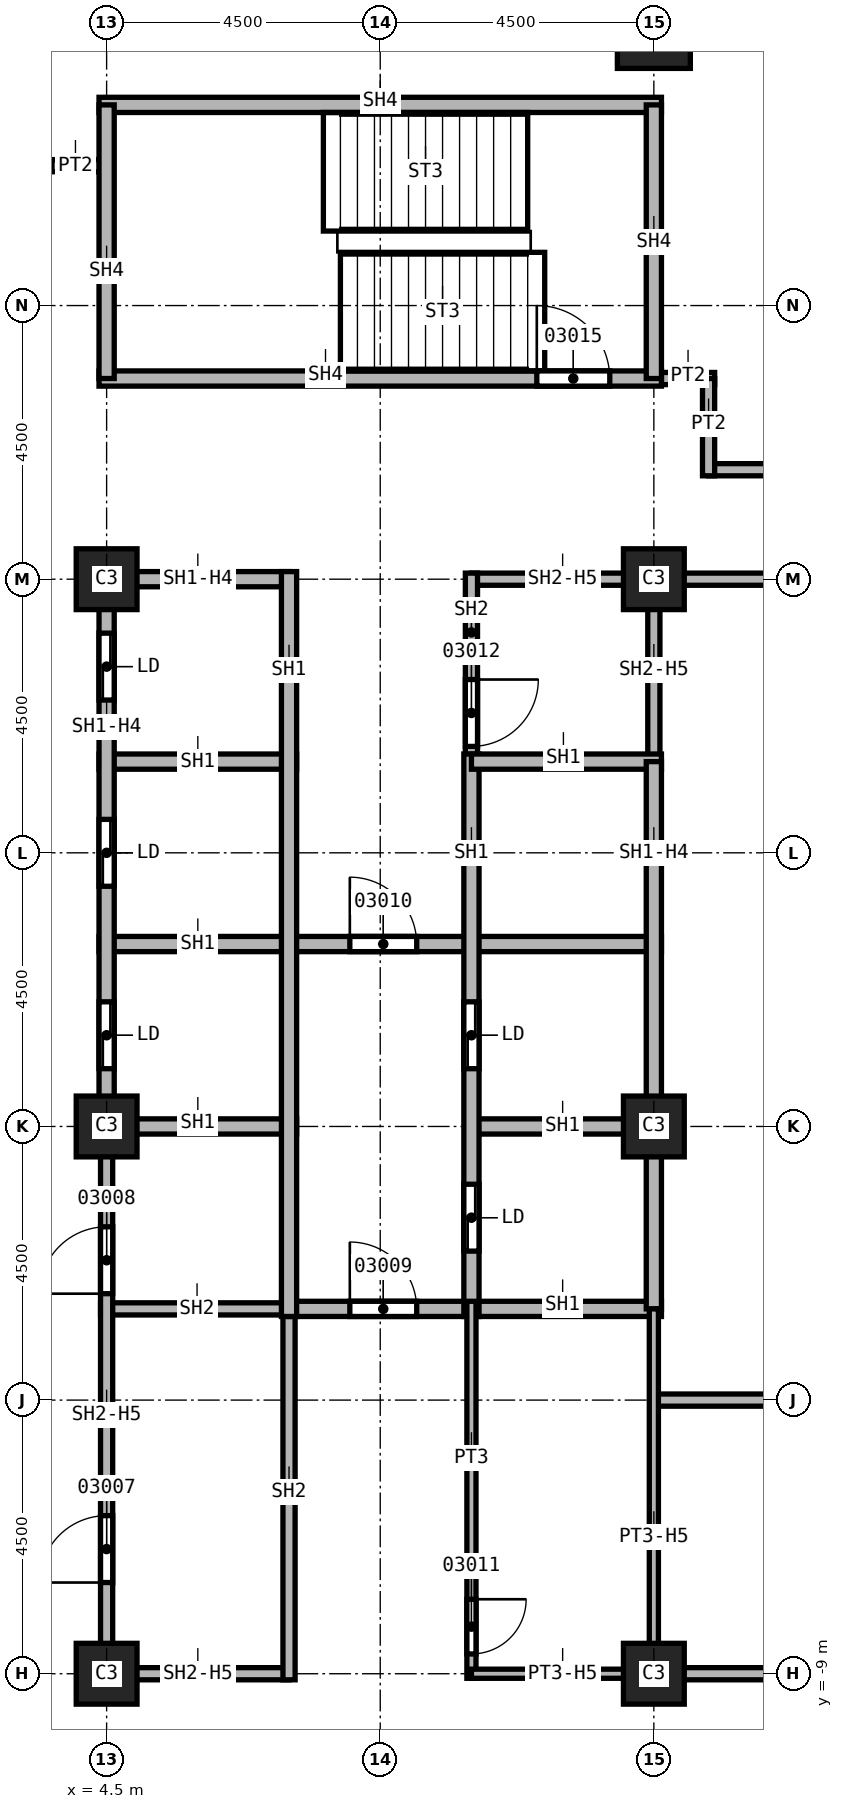
"""IFC4 building model, lengths in metres.
Left out: names, types, materials, properties, quantities, classifications, styles, units other than length and angle.
Written with IfcOpenShell. Run it as: python <this file> out.ifc"""

import sys

from ifc_helpers import new_model, si_unit, direction, frame, frame_2d, origin, origin_2d, place, context, subcontext, project, spatial, rectangle, extrude, element, fill, save


model = new_model("IFC4")
c1 = context("Model", 3, precision=1e-05, world=origin(), true_north=direction((0.0, 1.0)))
c2 = subcontext(c1, "Body", "Model", "MODEL_VIEW")
j1 = project(units=[si_unit("LENGTHUNIT", "METRE"), si_unit("PLANEANGLEUNIT", "RADIAN")], contexts=[c1])
p1 = place(None, origin())
s1 = spatial("IfcSite", under=j1, at=p1, CompositionType="ELEMENT")
p2 = place(p1, origin())
s2 = spatial("IfcBuilding", under=s1, at=p2, CompositionType="ELEMENT")
p3 = place(p2, frame((0.0, 0.0, 92.0)))
s3 = spatial("IfcBuildingStorey", under=s2, at=p3, CompositionType="ELEMENT", Elevation=92.0)
p4 = place(p3, frame((13.5, 18.0, 0.0), z_axis=(0.0, 0.0, 1.0), x_axis=(1.0, 0.0, 0.0)))
e1 = element("IfcColumn", 1, at=p4, inside=s3, PredefinedType="COLUMN", context=c2, shape_type="SweptSolid", body=[
    extrude(rectangle(XDim=1.2, YDim=1.2, at=origin_2d()), origin(), (0.0, 0.0, 1.0), 3.7),
])
for number, where, z_axis, x_axis in (
    (2, (4.5, 0.0, 0.0), (0.0, 0.0, 1.0), (1.0, 0.0, 0.0)),
    (3, (4.5, 9.0, 0.0), (0.0, 0.0, 1.0), (1.0, 0.0, 0.0)),
    (4, (4.5, -9.0, 0.0), (0.0, 0.0, 1.0), (1.0, 0.0, 0.0)),
    (5, (13.5, 0.0, 0.0), (0.0, 0.0, 1.0), (1.0, 0.0, 0.0)),
    (6, (13.5, 9.0, 0.0), (0.0, 0.0, 1.0), (1.0, 0.0, 0.0)),
    (7, (13.5, -9.0, 0.0), (0.0, 0.0, 1.0), (1.0, 0.0, 0.0)),
):
    element("IfcColumn", number, at=place(p3, frame(where, z_axis=z_axis, x_axis=x_axis)), inside=s3, PredefinedType="COLUMN", context=c2, shape_type="SweptSolid", body=[
        extrude(rectangle(XDim=1.0, YDim=1.0, at=origin_2d()), origin(), (0.0, 0.0, 1.0), 3.7),
    ])
p5 = place(p3, frame((3.6, 15.8, 0.0), z_axis=(0.0, 0.0, 1.0), x_axis=(1.0, 0.0, 0.0)))
e8 = element("IfcWall", 8, at=p5, inside=s3, PredefinedType="PARTITIONING", context=c2, shape_type="SweptSolid", body=[
    extrude(rectangle(XDim=0.9, YDim=0.2, at=frame_2d((0.45, 0.0))), origin(), (0.0, 0.0, 1.0), 3.7),
])
p6 = place(p3, frame((13.375, 12.3, 0.0), z_axis=(0.0, 0.0, 1.0), x_axis=(1.0, 0.0, 0.0)))
e9 = element("IfcWall", 9, at=p6, inside=s3, PredefinedType="PARTITIONING", context=c2, shape_type="SweptSolid", body=[
    extrude(rectangle(XDim=1.125, YDim=0.2, at=frame_2d((0.562, 0.0))), origin(), (0.0, 0.0, 1.0), 3.7),
])
for number, where, z_axis, x_axis in (
    (10, (13.5, -9.0, 0.0), (0.0, 0.0, 1.0), (1.0, 0.0, 0.0)),
    (11, (13.5, -4.5, 0.0), (0.0, 0.0, 1.0), (1.0, 0.0, 0.0)),
    (12, (18.0, 9.0, 0.0), (0.0, 0.0, 1.0), (-1.0, 0.0, 0.0)),
):
    element("IfcWall", number, at=place(p3, frame(where, z_axis=z_axis, x_axis=x_axis)), inside=s3, PredefinedType="PARTITIONING", context=c2, shape_type="SweptSolid", body=[
        extrude(rectangle(XDim=4.5, YDim=0.2, at=frame_2d((2.25, 0.0))), origin(), (0.0, 0.0, 1.0), 3.7),
    ])
p7 = place(p3, frame((14.4, 10.8, 0.0), z_axis=(0.0, 0.0, 1.0), x_axis=(1.0, 0.0, 0.0)))
e13 = element("IfcWall", 13, at=p7, inside=s3, PredefinedType="PARTITIONING", context=c2, shape_type="SweptSolid", body=[
    extrude(rectangle(XDim=3.6, YDim=0.2, at=frame_2d((1.8, 0.0))), origin(), (0.0, 0.0, 1.0), 3.7),
])
p8 = place(p3, frame((14.4, 12.3, 0.0), z_axis=(0.0, 0.0, 1.0), x_axis=(0.0, -1.0, 0.0)))
e14 = element("IfcWall", 14, at=p8, inside=s3, PredefinedType="PARTITIONING", context=c2, shape_type="SweptSolid", body=[
    extrude(rectangle(XDim=1.6, YDim=0.2, at=frame_2d((0.8, 0.0))), origin(), (0.0, 0.0, 1.0), 3.7),
])
p9 = place(p3, frame((4.4, -3.0, 0.0), z_axis=(0.0, 0.0, 1.0), x_axis=(1.0, 0.0, 0.0)))
e15 = element("IfcWall", 15, at=p9, inside=s3, PredefinedType="SOLIDWALL", context=c2, shape_type="SweptSolid", body=[
    extrude(rectangle(XDim=3.225, YDim=0.2, at=frame_2d((1.613, 0.0))), origin(), (0.0, 0.0, 1.0), 3.7),
])
p10 = place(p3, frame((4.5, -9.1, 0.0), z_axis=(0.0, 0.0, 1.0), x_axis=(0.0, 1.0, 0.0)))
e16 = element("IfcWall", 16, at=p10, inside=s3, PredefinedType="SOLIDWALL", context=c2, shape_type="SweptSolid", body=[
    extrude(rectangle(XDim=9.1, YDim=0.2, at=frame_2d((4.55, 0.0))), origin(), (0.0, 0.0, 1.0), 2.938),
])
p11 = place(p10, frame((1.6, 0.0, 0.0)))
e17 = element("IfcOpeningElement", 17, at=p11, cuts=e16, PredefinedType="OPENING", context=c2, shape_type="SweptSolid", body=[
    extrude(rectangle(XDim=1.1, YDim=2.1, at=frame_2d((0.55, 1.05))), frame((0.0, 0.1, 0.0), z_axis=(0.0, -1.0, 0.0), x_axis=(1.0, 0.0, 0.0)), (0.0, 0.0, 1.0), 0.2),
])
p12 = place(p10, frame((6.35, 0.0, 0.0)))
e18 = element("IfcOpeningElement", 18, at=p12, cuts=e16, PredefinedType="OPENING", context=c2, shape_type="SweptSolid", body=[
    extrude(rectangle(XDim=1.1, YDim=2.1, at=frame_2d((0.55, 1.05))), frame((0.0, 0.1, 0.0), z_axis=(0.0, -1.0, 0.0), x_axis=(1.0, 0.0, 0.0)), (0.0, 0.0, 1.0), 0.2),
])
p13 = place(p3, frame((7.5, -9.0, 0.0), z_axis=(0.0, 0.0, 1.0), x_axis=(-1.0, 0.0, 0.0)))
e19 = element("IfcWall", 19, at=p13, inside=s3, PredefinedType="SOLIDWALL", context=c2, shape_type="SweptSolid", body=[
    extrude(rectangle(XDim=3.0, YDim=0.2, at=frame_2d((1.5, 0.0))), origin(), (0.0, 0.0, 1.0), 2.938),
])
p14 = place(p3, frame((7.5, -2.875, 0.0), z_axis=(0.0, 0.0, 1.0), x_axis=(0.0, -1.0, 0.0)))
e20 = element("IfcWall", 20, at=p14, inside=s3, PredefinedType="SOLIDWALL", context=c2, shape_type="SweptSolid", body=[
    extrude(rectangle(XDim=6.225, YDim=0.2, at=frame_2d((3.113, 0.0))), origin(), (0.0, 0.0, 1.0), 3.7),
])
p15 = place(p3, frame((10.5, 9.0, 0.0), z_axis=(0.0, 0.0, 1.0), x_axis=(1.0, 0.0, 0.0)))
e21 = element("IfcWall", 21, at=p15, inside=s3, PredefinedType="SOLIDWALL", context=c2, shape_type="SweptSolid", body=[
    extrude(rectangle(XDim=3.1, YDim=0.2, at=frame_2d((1.55, 0.0))), origin(), (0.0, 0.0, 1.0), 2.938),
])
p16 = place(p3, frame((10.5, 9.1, 0.0), z_axis=(0.0, 0.0, 1.0), x_axis=(0.0, -1.0, 0.0)))
e22 = element("IfcWall", 22, at=p16, inside=s3, PredefinedType="SOLIDWALL", context=c2, shape_type="SweptSolid", body=[
    extrude(rectangle(XDim=3.225, YDim=0.2, at=frame_2d((1.613, 0.0))), origin(), (0.0, 0.0, 1.0), 3.7),
])
p17 = place(p16, frame((1.75, 0.0, 0.0)))
e23 = element("IfcOpeningElement", 23, at=p17, cuts=e22, PredefinedType="OPENING", context=c2, shape_type="SweptSolid", body=[
    extrude(rectangle(XDim=1.1, YDim=2.1, at=frame_2d((0.55, 1.05))), frame((0.0, 0.1, 0.0), z_axis=(0.0, -1.0, 0.0), x_axis=(1.0, 0.0, 0.0)), (0.0, 0.0, 1.0), 0.2),
])
p18 = place(p3, frame((13.5, 9.1, 0.0), z_axis=(0.0, 0.0, 1.0), x_axis=(0.0, -1.0, 0.0)))
e24 = element("IfcWall", 24, at=p18, inside=s3, PredefinedType="SOLIDWALL", context=c2, shape_type="SweptSolid", body=[
    extrude(rectangle(XDim=3.1, YDim=0.2, at=frame_2d((1.55, 0.0))), origin(), (0.0, 0.0, 1.0), 2.938),
])
p19 = place(p3, frame((4.375, 0.0, 0.0), z_axis=(0.0, 0.0, 1.0), x_axis=(1.0, 0.0, 0.0)))
e25 = element("IfcWall", 25, at=p19, inside=s3, PredefinedType="SOLIDWALL", context=c2, shape_type="SweptSolid", body=[
    extrude(rectangle(XDim=3.25, YDim=0.25, at=frame_2d((1.625, 0.0))), origin(), (0.0, 0.0, 1.0), 3.7),
])
p20 = place(p3, frame((4.375, 3.0, 0.0), z_axis=(0.0, 0.0, 1.0), x_axis=(1.0, 0.0, 0.0)))
e26 = element("IfcWall", 26, at=p20, inside=s3, PredefinedType="SOLIDWALL", context=c2, shape_type="SweptSolid", body=[
    extrude(rectangle(XDim=9.25, YDim=0.25, at=frame_2d((4.625, 0.0))), origin(), (0.0, 0.0, 1.0), 3.7),
])
p21 = place(p20, frame((4.125, 0.0, 0.0)))
e27 = element("IfcOpeningElement", 27, at=p21, cuts=e26, PredefinedType="OPENING", context=c2, shape_type="SweptSolid", body=[
    extrude(rectangle(XDim=1.1, YDim=2.1, at=frame_2d((0.55, 1.05))), frame((0.0, 0.125, 0.0), z_axis=(0.0, -1.0, 0.0), x_axis=(1.0, 0.0, 0.0)), (0.0, 0.0, 1.0), 0.25),
])
p22 = place(p3, frame((4.375, 6.0, 0.0), z_axis=(0.0, 0.0, 1.0), x_axis=(1.0, 0.0, 0.0)))
e28 = element("IfcWall", 28, at=p22, inside=s3, PredefinedType="SOLIDWALL", context=c2, shape_type="SweptSolid", body=[
    extrude(rectangle(XDim=3.25, YDim=0.25, at=frame_2d((1.625, 0.0))), origin(), (0.0, 0.0, 1.0), 3.7),
])
p23 = place(p3, frame((4.5, 0.0, 0.0), z_axis=(0.0, 0.0, 1.0), x_axis=(0.0, 1.0, 0.0)))
e29 = element("IfcWall", 29, at=p23, inside=s3, PredefinedType="SOLIDWALL", context=c2, shape_type="SweptSolid", body=[
    extrude(rectangle(XDim=9.125, YDim=0.25, at=frame_2d((4.562, 0.0))), origin(), (0.0, 0.0, 1.0), 2.938),
])
p24 = place(p23, frame((0.95, 0.0, 0.0)))
e30 = element("IfcOpeningElement", 30, at=p24, cuts=e29, PredefinedType="OPENING", context=c2, shape_type="SweptSolid", body=[
    extrude(rectangle(XDim=1.1, YDim=2.1, at=frame_2d((0.55, 1.05))), frame((0.0, 0.125, 0.0), z_axis=(0.0, -1.0, 0.0), x_axis=(1.0, 0.0, 0.0)), (0.0, 0.0, 1.0), 0.25),
])
p25 = place(p23, frame((3.95, 0.0, 0.0)))
e31 = element("IfcOpeningElement", 31, at=p25, cuts=e29, PredefinedType="OPENING", context=c2, shape_type="SweptSolid", body=[
    extrude(rectangle(XDim=1.1, YDim=2.1, at=frame_2d((0.55, 1.05))), frame((0.0, 0.125, 0.0), z_axis=(0.0, -1.0, 0.0), x_axis=(1.0, 0.0, 0.0)), (0.0, 0.0, 1.0), 0.25),
])
p26 = place(p23, frame((7.012, 0.0, 0.0)))
e32 = element("IfcOpeningElement", 32, at=p26, cuts=e29, PredefinedType="OPENING", context=c2, shape_type="SweptSolid", body=[
    extrude(rectangle(XDim=1.1, YDim=2.1, at=frame_2d((0.55, 1.05))), frame((0.0, 0.125, 0.0), z_axis=(0.0, -1.0, 0.0), x_axis=(1.0, 0.0, 0.0)), (0.0, 0.0, 1.0), 0.25),
])
p27 = place(p3, frame((4.5, 9.0, 0.0), z_axis=(0.0, 0.0, 1.0), x_axis=(1.0, 0.0, 0.0)))
e33 = element("IfcWall", 33, at=p27, inside=s3, PredefinedType="SOLIDWALL", context=c2, shape_type="SweptSolid", body=[
    extrude(rectangle(XDim=3.0, YDim=0.25, at=frame_2d((1.5, 0.0))), origin(), (0.0, 0.0, 1.0), 2.938),
])
p28 = place(p3, frame((7.5, -3.0, 0.0), z_axis=(0.0, 0.0, 1.0), x_axis=(1.0, 0.0, 0.0)))
e34 = element("IfcWall", 34, at=p28, inside=s3, PredefinedType="SOLIDWALL", context=c2, shape_type="SweptSolid", body=[
    extrude(rectangle(XDim=6.125, YDim=0.25, at=frame_2d((3.062, 0.0))), origin(), (0.0, 0.0, 1.0), 3.7),
])
p29 = place(p28, frame((1.0, 0.0, 0.0)))
e35 = element("IfcOpeningElement", 35, at=p29, cuts=e34, PredefinedType="OPENING", context=c2, shape_type="SweptSolid", body=[
    extrude(rectangle(XDim=1.1, YDim=2.1, at=frame_2d((0.55, 1.05))), frame((0.0, 0.125, 0.0), z_axis=(0.0, -1.0, 0.0), x_axis=(1.0, 0.0, 0.0)), (0.0, 0.0, 1.0), 0.25),
])
p30 = place(p3, frame((7.5, 9.125, 0.0), z_axis=(0.0, 0.0, 1.0), x_axis=(0.0, -1.0, 0.0)))
e36 = element("IfcWall", 36, at=p30, inside=s3, PredefinedType="SOLIDWALL", context=c2, shape_type="SweptSolid", body=[
    extrude(rectangle(XDim=12.25, YDim=0.25, at=frame_2d((6.125, 0.0))), origin(), (0.0, 0.0, 1.0), 3.7),
])
p31 = place(p3, frame((10.5, 0.0, 0.0), z_axis=(0.0, 0.0, 1.0), x_axis=(1.0, 0.0, 0.0)))
e37 = element("IfcWall", 37, at=p31, inside=s3, PredefinedType="SOLIDWALL", context=c2, shape_type="SweptSolid", body=[
    extrude(rectangle(XDim=3.125, YDim=0.25, at=frame_2d((1.562, 0.0))), origin(), (0.0, 0.0, 1.0), 3.7),
])
p32 = place(p3, frame((10.5, 6.125, 0.0), z_axis=(0.0, 0.0, 1.0), x_axis=(0.0, -1.0, 0.0)))
e38 = element("IfcWall", 38, at=p32, inside=s3, PredefinedType="SOLIDWALL", context=c2, shape_type="SweptSolid", body=[
    extrude(rectangle(XDim=9.25, YDim=0.25, at=frame_2d((4.625, 0.0))), origin(), (0.0, 0.0, 1.0), 3.7),
])
p33 = place(p32, frame((7.075, 0.0, 0.0)))
e39 = element("IfcOpeningElement", 39, at=p33, cuts=e38, PredefinedType="OPENING", context=c2, shape_type="SweptSolid", body=[
    extrude(rectangle(XDim=1.1, YDim=2.1, at=frame_2d((0.55, 1.05))), frame((0.0, 0.125, 0.0), z_axis=(0.0, -1.0, 0.0), x_axis=(1.0, 0.0, 0.0)), (0.0, 0.0, 1.0), 0.25),
])
p34 = place(p32, frame((4.075, 0.0, 0.0)))
e40 = element("IfcOpeningElement", 40, at=p34, cuts=e38, PredefinedType="OPENING", context=c2, shape_type="SweptSolid", body=[
    extrude(rectangle(XDim=1.1, YDim=2.1, at=frame_2d((0.55, 1.05))), frame((0.0, 0.125, 0.0), z_axis=(0.0, -1.0, 0.0), x_axis=(1.0, 0.0, 0.0)), (0.0, 0.0, 1.0), 0.25),
])
p35 = place(p3, frame((10.5, 6.0, 0.0), z_axis=(0.0, 0.0, 1.0), x_axis=(1.0, 0.0, 0.0)))
e41 = element("IfcWall", 41, at=p35, inside=s3, PredefinedType="SOLIDWALL", context=c2, shape_type="SweptSolid", body=[
    extrude(rectangle(XDim=3.125, YDim=0.25, at=frame_2d((1.562, 0.0))), origin(), (0.0, 0.0, 1.0), 3.7),
])
p36 = place(p3, frame((13.5, 6.0, 0.0), z_axis=(0.0, 0.0, 1.0), x_axis=(0.0, -1.0, 0.0)))
e42 = element("IfcWall", 42, at=p36, inside=s3, PredefinedType="SOLIDWALL", context=c2, shape_type="SweptSolid", body=[
    extrude(rectangle(XDim=9.0, YDim=0.25, at=frame_2d((4.5, 0.0))), origin(), (0.0, 0.0, 1.0), 2.938),
])
p37 = place(p3, frame((4.375, 12.3, 0.0), z_axis=(0.0, 0.0, 1.0), x_axis=(1.0, 0.0, 0.0)))
e43 = element("IfcWall", 43, at=p37, inside=s3, PredefinedType="SOLIDWALL", context=c2, shape_type="SweptSolid", body=[
    extrude(rectangle(XDim=9.25, YDim=0.25, at=frame_2d((4.625, 0.0))), origin(), (0.0, 0.0, 1.0), 3.7),
])
p38 = place(p37, frame((7.2, 0.0, 0.0)))
e44 = element("IfcOpeningElement", 44, at=p38, cuts=e43, PredefinedType="OPENING", context=c2, shape_type="SweptSolid", body=[
    extrude(rectangle(XDim=1.2, YDim=2.1, at=frame_2d((0.6, 1.05))), frame((0.0, 0.125, 0.0), z_axis=(0.0, -1.0, 0.0), x_axis=(1.0, 0.0, 0.0)), (0.0, 0.0, 1.0), 0.25),
])
p39 = place(p3, frame((4.375, 16.8, 0.0), z_axis=(0.0, 0.0, 1.0), x_axis=(1.0, 0.0, 0.0)))
e45 = element("IfcWall", 45, at=p39, inside=s3, PredefinedType="SOLIDWALL", context=c2, shape_type="SweptSolid", body=[
    extrude(rectangle(XDim=9.25, YDim=0.25, at=frame_2d((4.625, 0.0))), origin(), (0.0, 0.0, 1.0), 3.7),
])
for number, where, z_axis, x_axis in (
    (46, (4.5, 12.3, 0.0), (0.0, 0.0, 1.0), (0.0, 1.0, 0.0)),
    (47, (13.5, 16.8, 0.0), (0.0, 0.0, 1.0), (0.0, -1.0, 0.0)),
):
    element("IfcWall", number, at=place(p3, frame(where, z_axis=z_axis, x_axis=x_axis)), inside=s3, PredefinedType="SOLIDWALL", context=c2, shape_type="SweptSolid", body=[
        extrude(rectangle(XDim=4.5, YDim=0.25, at=frame_2d((2.25, 0.0))), origin(), (0.0, 0.0, 1.0), 3.7),
    ])
p40 = place(p3, frame((10.5, -2.875, 0.0), z_axis=(0.0, 0.0, 1.0), x_axis=(0.0, -1.0, 0.0)))
e48 = element("IfcWall", 48, at=p40, inside=s3, PredefinedType="PARTITIONING", context=c2, shape_type="SweptSolid", body=[
    extrude(rectangle(XDim=6.2, YDim=0.15, at=frame_2d((3.1, 0.0))), origin(), (0.0, 0.0, 1.0), 3.7),
])
p41 = place(p40, frame((4.9, 0.0, 0.0)))
e49 = element("IfcOpeningElement", 49, at=p41, cuts=e48, PredefinedType="OPENING", context=c2, shape_type="SweptSolid", body=[
    extrude(rectangle(XDim=0.9, YDim=2.1, at=frame_2d((0.45, 1.05))), frame((0.0, 0.075, 0.0), z_axis=(0.0, -1.0, 0.0), x_axis=(1.0, 0.0, 0.0)), (0.0, 0.0, 1.0), 0.15),
])
p42 = place(p3, frame((13.5, -3.0, 0.0), z_axis=(0.0, 0.0, 1.0), x_axis=(0.0, -1.0, 0.0)))
e50 = element("IfcWall", 50, at=p42, inside=s3, PredefinedType="PARTITIONING", context=c2, shape_type="SweptSolid", body=[
    extrude(rectangle(XDim=6.1, YDim=0.15, at=frame_2d((3.05, 0.0))), origin(), (0.0, 0.0, 1.0), 2.938),
])
p43 = place(p3, frame((13.575, -9.0, 0.0), z_axis=(0.0, 0.0, 1.0), x_axis=(-1.0, 0.0, 0.0)))
e51 = element("IfcWall", 51, at=p43, inside=s3, PredefinedType="PARTITIONING", context=c2, shape_type="SweptSolid", body=[
    extrude(rectangle(XDim=3.075, YDim=0.15, at=frame_2d((1.538, 0.0))), origin(), (0.0, 0.0, 1.0), 2.938),
])
p44 = place(p11, origin())
e52 = element("IfcDoor", 52, at=p44, inside=s3, OperationType="SINGLE_SWING_RIGHT", PredefinedType="DOOR", context=c2, shape_type="SweptSolid", body=[
    extrude(rectangle(XDim=1.1, YDim=2.1, at=frame_2d((0.55, 1.05))), frame((0.0, 0.025, 0.0), z_axis=(0.0, -1.0, 0.0), x_axis=(1.0, 0.0, 0.0)), (0.0, 0.0, 1.0), 0.05),
])
fill(e17, e52)
p45 = place(p12, origin())
e53 = element("IfcDoor", 53, at=p45, inside=s3, OperationType="SINGLE_SWING_LEFT", PredefinedType="DOOR", context=c2, shape_type="SweptSolid", body=[
    extrude(rectangle(XDim=1.1, YDim=2.1, at=frame_2d((0.55, 1.05))), frame((0.0, 0.025, 0.0), z_axis=(0.0, -1.0, 0.0), x_axis=(1.0, 0.0, 0.0)), (0.0, 0.0, 1.0), 0.05),
])
fill(e18, e53)
p46 = place(p29, origin())
e54 = element("IfcDoor", 54, at=p46, inside=s3, OperationType="SINGLE_SWING_RIGHT", PredefinedType="DOOR", context=c2, shape_type="SweptSolid", body=[
    extrude(rectangle(XDim=1.1, YDim=2.1, at=frame_2d((0.55, 1.05))), frame((0.0, 0.025, 0.0), z_axis=(0.0, -1.0, 0.0), x_axis=(1.0, 0.0, 0.0)), (0.0, 0.0, 1.0), 0.05),
])
fill(e35, e54)
p47 = place(p21, origin())
e55 = element("IfcDoor", 55, at=p47, inside=s3, OperationType="SINGLE_SWING_LEFT", PredefinedType="DOOR", context=c2, shape_type="SweptSolid", body=[
    extrude(rectangle(XDim=1.1, YDim=2.1, at=frame_2d((0.55, 1.05))), frame((0.0, 0.025, 0.0), z_axis=(0.0, -1.0, 0.0), x_axis=(1.0, 0.0, 0.0)), (0.0, 0.0, 1.0), 0.05),
])
fill(e27, e55)
p48 = place(p41, origin())
e56 = element("IfcDoor", 56, at=p48, inside=s3, OperationType="SINGLE_SWING_RIGHT", PredefinedType="DOOR", context=c2, shape_type="SweptSolid", body=[
    extrude(rectangle(XDim=0.9, YDim=2.1, at=frame_2d((0.45, 1.05))), frame((0.0, 0.025, 0.0), z_axis=(0.0, -1.0, 0.0), x_axis=(1.0, 0.0, 0.0)), (0.0, 0.0, 1.0), 0.05),
])
fill(e49, e56)
p49 = place(p17, origin())
e57 = element("IfcDoor", 57, at=p49, inside=s3, OperationType="SINGLE_SWING_LEFT", PredefinedType="DOOR", context=c2, shape_type="SweptSolid", body=[
    extrude(rectangle(XDim=1.1, YDim=2.1, at=frame_2d((0.55, 1.05))), frame((0.0, 0.025, 0.0), z_axis=(0.0, -1.0, 0.0), x_axis=(1.0, 0.0, 0.0)), (0.0, 0.0, 1.0), 0.05),
])
fill(e23, e57)
p50 = place(p38, origin())
e58 = element("IfcDoor", 58, at=p50, inside=s3, OperationType="SINGLE_SWING_RIGHT", PredefinedType="DOOR", context=c2, shape_type="SweptSolid", body=[
    extrude(rectangle(XDim=1.2, YDim=2.1, at=frame_2d((0.6, 1.05))), frame((0.0, 0.025, 0.0), z_axis=(0.0, -1.0, 0.0), x_axis=(1.0, 0.0, 0.0)), (0.0, 0.0, 1.0), 0.05),
])
fill(e44, e58)
p51 = place(p24, origin())
e59 = element("IfcDoor", 59, at=p51, inside=s3, OperationType="SLIDING_TO_LEFT", PredefinedType="DOOR", context=c2, shape_type="SweptSolid", body=[
    extrude(rectangle(XDim=1.1, YDim=2.1, at=frame_2d((0.55, 1.05))), frame((0.0, 0.025, 0.0), z_axis=(0.0, -1.0, 0.0), x_axis=(1.0, 0.0, 0.0)), (0.0, 0.0, 1.0), 0.05),
])
fill(e30, e59)
p52 = place(p25, origin())
e60 = element("IfcDoor", 60, at=p52, inside=s3, OperationType="SLIDING_TO_LEFT", PredefinedType="DOOR", context=c2, shape_type="SweptSolid", body=[
    extrude(rectangle(XDim=1.1, YDim=2.1, at=frame_2d((0.55, 1.05))), frame((0.0, 0.025, 0.0), z_axis=(0.0, -1.0, 0.0), x_axis=(1.0, 0.0, 0.0)), (0.0, 0.0, 1.0), 0.05),
])
fill(e31, e60)
p53 = place(p26, origin())
e61 = element("IfcDoor", 61, at=p53, inside=s3, OperationType="SLIDING_TO_LEFT", PredefinedType="DOOR", context=c2, shape_type="SweptSolid", body=[
    extrude(rectangle(XDim=1.1, YDim=2.1, at=frame_2d((0.55, 1.05))), frame((0.0, 0.025, 0.0), z_axis=(0.0, -1.0, 0.0), x_axis=(1.0, 0.0, 0.0)), (0.0, 0.0, 1.0), 0.05),
])
fill(e32, e61)
p54 = place(p33, origin())
e62 = element("IfcDoor", 62, at=p54, inside=s3, OperationType="SLIDING_TO_LEFT", PredefinedType="DOOR", context=c2, shape_type="SweptSolid", body=[
    extrude(rectangle(XDim=1.1, YDim=2.1, at=frame_2d((0.55, 1.05))), frame((0.0, 0.025, 0.0), z_axis=(0.0, -1.0, 0.0), x_axis=(1.0, 0.0, 0.0)), (0.0, 0.0, 1.0), 0.05),
])
fill(e39, e62)
p55 = place(p34, origin())
e63 = element("IfcDoor", 63, at=p55, inside=s3, OperationType="SLIDING_TO_LEFT", PredefinedType="DOOR", context=c2, shape_type="SweptSolid", body=[
    extrude(rectangle(XDim=1.1, YDim=2.1, at=frame_2d((0.55, 1.05))), frame((0.0, 0.025, 0.0), z_axis=(0.0, -1.0, 0.0), x_axis=(1.0, 0.0, 0.0)), (0.0, 0.0, 1.0), 0.05),
])
fill(e40, e63)
save(model, sys.argv[1])
